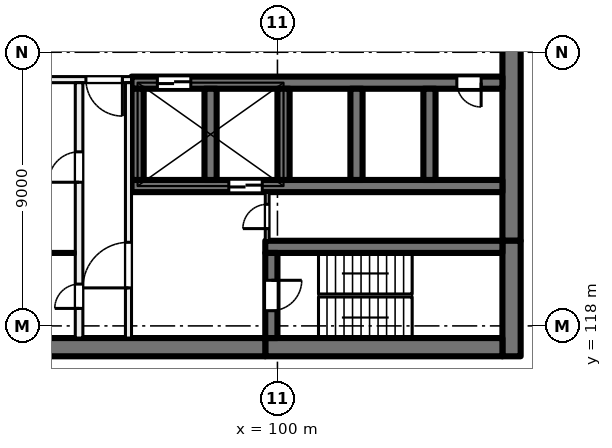
"""IFC4 building model, lengths in metres.
Left out: names, types, materials, properties, quantities, classifications, styles, units other than length and angle.
Written with IfcOpenShell. Run it as: python <this file> out.ifc"""

import sys

from ifc_helpers import new_model, si_unit, direction, frame, frame_2d, origin, place, context, subcontext, project, spatial, rectangle, extrude, element, fill, save


model = new_model("IFC4")
c1 = context("Model", 3, precision=1e-05, world=origin(), true_north=direction((0.0, 1.0)))
c2 = subcontext(c1, "Body", "Model", "MODEL_VIEW")
j1 = project(units=[si_unit("LENGTHUNIT", "METRE"), si_unit("PLANEANGLEUNIT", "RADIAN")], contexts=[c1])
p1 = place(None, origin())
s1 = spatial("IfcSite", under=j1, at=p1, CompositionType="ELEMENT")
p2 = place(p1, origin())
s2 = spatial("IfcBuilding", under=s1, at=p2, CompositionType="ELEMENT")
p3 = place(p2, frame((0.0, 0.0, 63.5)))
s3 = spatial("IfcBuildingStorey", under=s2, at=p3, CompositionType="ELEMENT", Elevation=63.5)
p4 = place(p3, frame((107.7, 135.2, 0.0), z_axis=(0.0, 0.0, 1.0), x_axis=(0.0, -1.0, 0.0)))
e1 = element("IfcWall", 1, at=p4, inside=s3, PredefinedType="SHEAR", context=c2, shape_type="SweptSolid", body=[
    extrude(rectangle(XDim=14.4, YDim=0.6, at=frame_2d((7.2, 0.0))), origin(), (0.0, 0.0, 1.0), 4.0),
])
p5 = place(p3, frame((107.7, 120.8, 0.0), z_axis=(0.0, 0.0, 1.0), x_axis=(0.0, -1.0, 0.0)))
e2 = element("IfcWall", 2, at=p5, inside=s3, PredefinedType="SHEAR", context=c2, shape_type="SweptSolid", body=[
    extrude(rectangle(XDim=3.8, YDim=0.6, at=frame_2d((1.9, 0.0))), origin(), (0.0, 0.0, 1.0), 4.0),
])
p6 = place(p3, frame((107.4, 117.3, 0.0), z_axis=(0.0, 0.0, 1.0), x_axis=(-1.0, 0.0, 0.0)))
e3 = element("IfcWall", 3, at=p6, inside=s3, PredefinedType="SHEAR", context=c2, shape_type="SweptSolid", body=[
    extrude(rectangle(XDim=7.8, YDim=0.6, at=frame_2d((3.9, 0.0))), origin(), (0.0, 0.0, 1.0), 4.0),
])
p7 = place(p3, frame((99.6, 117.3, 0.0), z_axis=(0.0, 0.0, 1.0), x_axis=(-1.0, 0.0, 0.0)))
e4 = element("IfcWall", 4, at=p7, inside=s3, PredefinedType="SHEAR", context=c2, shape_type="SweptSolid", body=[
    extrude(rectangle(XDim=8.9, YDim=0.6, at=frame_2d((4.45, 0.0))), origin(), (0.0, 0.0, 1.0), 4.0),
])
p8 = place(p3, frame((107.4, 120.6, 0.0), z_axis=(0.0, 0.0, 1.0), x_axis=(-1.0, 0.0, 0.0)))
e5 = element("IfcWall", 5, at=p8, inside=s3, PredefinedType="SHEAR", context=c2, shape_type="SweptSolid", body=[
    extrude(rectangle(XDim=7.8, YDim=0.4, at=frame_2d((3.9, 0.0))), origin(), (0.0, 0.0, 1.0), 4.0),
])
p9 = place(p3, frame((99.8, 120.4, 0.0), z_axis=(0.0, 0.0, 1.0), x_axis=(0.0, -1.0, 0.0)))
e6 = element("IfcWall", 6, at=p9, inside=s3, PredefinedType="SHEAR", context=c2, shape_type="SweptSolid", body=[
    extrude(rectangle(XDim=2.8, YDim=0.4, at=frame_2d((1.4, 0.0))), origin(), (0.0, 0.0, 1.0), 4.0),
])
p10 = place(p9, frame((0.9, 0.0, 0.0)))
e7 = element("IfcOpeningElement", 7, at=p10, cuts=e6, PredefinedType="OPENING", context=c2, shape_type="SweptSolid", body=[
    extrude(rectangle(XDim=1.0, YDim=2.1, at=frame_2d((0.5, 1.05))), frame((0.0, 0.21, 0.0), z_axis=(0.0, -1.0, 0.0), x_axis=(1.0, 0.0, 0.0)), (0.0, 0.0, 1.0), 0.42),
])
p11 = place(p3, frame((107.4, 126.0, 0.0), z_axis=(0.0, 0.0, 1.0), x_axis=(-1.0, 0.0, 0.0)))
e8 = element("IfcWall", 8, at=p11, inside=s3, PredefinedType="SHEAR", context=c2, shape_type="SweptSolid", body=[
    extrude(rectangle(XDim=12.2, YDim=0.4, at=frame_2d((6.1, 0.0))), origin(), (0.0, 0.0, 1.0), 4.0),
])
p12 = place(p11, frame((10.25, 0.0, 0.0)))
e9 = element("IfcOpeningElement", 9, at=p12, cuts=e8, PredefinedType="OPENING", context=c2, shape_type="SweptSolid", body=[
    extrude(rectangle(XDim=1.1, YDim=2.1, at=frame_2d((0.55, 1.05))), frame((0.0, 0.21, 0.0), z_axis=(0.0, -1.0, 0.0), x_axis=(1.0, 0.0, 0.0)), (0.0, 0.0, 1.0), 0.42),
])
p13 = place(p11, frame((0.7, 0.0, 0.0)))
e10 = element("IfcOpeningElement", 10, at=p13, cuts=e8, PredefinedType="OPENING", context=c2, shape_type="SweptSolid", body=[
    extrude(rectangle(XDim=0.8, YDim=2.1, at=frame_2d((0.4, 1.05))), frame((0.0, 0.21, 0.0), z_axis=(0.0, -1.0, 0.0), x_axis=(1.0, 0.0, 0.0)), (0.0, 0.0, 1.0), 0.42),
])
p14 = place(p3, frame((107.4, 122.6, 0.0), z_axis=(0.0, 0.0, 1.0), x_axis=(-1.0, 0.0, 0.0)))
e11 = element("IfcWall", 11, at=p14, inside=s3, PredefinedType="SHEAR", context=c2, shape_type="SweptSolid", body=[
    extrude(rectangle(XDim=12.2, YDim=0.4, at=frame_2d((6.1, 0.0))), origin(), (0.0, 0.0, 1.0), 4.0),
])
p15 = place(p14, frame((7.9, 0.0, 0.0)))
e12 = element("IfcOpeningElement", 12, at=p15, cuts=e11, PredefinedType="OPENING", context=c2, shape_type="SweptSolid", body=[
    extrude(rectangle(XDim=1.1, YDim=2.1, at=frame_2d((0.55, 1.05))), frame((0.0, 0.21, 0.0), z_axis=(0.0, -1.0, 0.0), x_axis=(1.0, 0.0, 0.0)), (0.0, 0.0, 1.0), 0.42),
])
for number, where, z_axis, x_axis in (
    (13, (105.0, 125.8, 0.0), (0.0, 0.0, 1.0), (0.0, -1.0, 0.0)),
    (14, (102.6, 125.8, 0.0), (0.0, 0.0, 1.0), (0.0, -1.0, 0.0)),
    (15, (100.2, 125.8, 0.0), (0.0, 0.0, 1.0), (0.0, -1.0, 0.0)),
    (16, (97.8, 125.8, 0.0), (0.0, 0.0, 1.0), (0.0, -1.0, 0.0)),
    (17, (95.4, 125.8, 0.0), (0.0, 0.0, 1.0), (0.0, -1.0, 0.0)),
):
    element("IfcWall", number, at=place(p3, frame(where, z_axis=z_axis, x_axis=x_axis)), inside=s3, PredefinedType="SHEAR", context=c2, shape_type="SweptSolid", body=[
        extrude(rectangle(XDim=3.0, YDim=0.4, at=frame_2d((1.5, 0.0))), origin(), (0.0, 0.0, 1.0), 4.0),
    ])
p16 = place(p3, frame((95.2, 126.1, 0.0), z_axis=(0.0, 0.0, 1.0), x_axis=(-1.0, 0.0, 0.0)))
e18 = element("IfcWall", 18, at=p16, inside=s3, PredefinedType="PARTITIONING", context=c2, shape_type="SweptSolid", body=[
    extrude(rectangle(XDim=3.8, YDim=0.2, at=frame_2d((1.9, 0.0))), origin(), (0.0, 0.0, 1.0), 3.625),
])
p17 = place(p16, frame((0.3, 0.0, 0.0)))
e19 = element("IfcOpeningElement", 19, at=p17, cuts=e18, PredefinedType="OPENING", context=c2, shape_type="SweptSolid", body=[
    extrude(rectangle(XDim=1.2, YDim=2.1, at=frame_2d((0.6, 1.05))), frame((0.0, 0.11, 0.0), z_axis=(0.0, -1.0, 0.0), x_axis=(1.0, 0.0, 0.0)), (0.0, 0.0, 1.0), 0.22),
])
p18 = place(p3, frame((95.1, 117.6, 0.0), z_axis=(0.0, 0.0, 1.0), x_axis=(0.0, 1.0, 0.0)))
e20 = element("IfcWall", 20, at=p18, inside=s3, PredefinedType="PARTITIONING", context=c2, shape_type="SweptSolid", body=[
    extrude(rectangle(XDim=8.4, YDim=0.2, at=frame_2d((4.2, 0.0))), origin(), (0.0, 0.0, 1.0), 3.625),
])
p19 = place(p18, frame((1.65, 0.0, 0.0)))
e21 = element("IfcOpeningElement", 21, at=p19, cuts=e20, PredefinedType="OPENING", context=c2, shape_type="SweptSolid", body=[
    extrude(rectangle(XDim=1.5, YDim=2.1, at=frame_2d((0.75, 1.05))), frame((0.0, 0.11, 0.0), z_axis=(0.0, -1.0, 0.0), x_axis=(1.0, 0.0, 0.0)), (0.0, 0.0, 1.0), 0.22),
])
p20 = place(p3, frame((93.475, 117.6, 0.0), z_axis=(0.0, 0.0, 1.0), x_axis=(0.0, 1.0, 0.0)))
e22 = element("IfcWall", 22, at=p20, inside=s3, PredefinedType="PARTITIONING", context=c2, shape_type="SweptSolid", body=[
    extrude(rectangle(XDim=8.4, YDim=0.25, at=frame_2d((4.2, 0.0))), origin(), (0.0, 0.0, 1.0), 3.625),
])
p21 = place(p20, frame((5.125, 0.0, 0.0)))
e23 = element("IfcOpeningElement", 23, at=p21, cuts=e22, PredefinedType="OPENING", context=c2, shape_type="SweptSolid", body=[
    extrude(rectangle(XDim=1.0, YDim=2.1, at=frame_2d((0.5, 1.05))), frame((0.0, 0.135, 0.0), z_axis=(0.0, -1.0, 0.0), x_axis=(1.0, 0.0, 0.0)), (0.0, 0.0, 1.0), 0.27),
])
p22 = place(p20, frame((0.975, 0.0, 0.0)))
e24 = element("IfcOpeningElement", 24, at=p22, cuts=e22, PredefinedType="OPENING", context=c2, shape_type="SweptSolid", body=[
    extrude(rectangle(XDim=0.8, YDim=2.1, at=frame_2d((0.4, 1.05))), frame((0.0, 0.135, 0.0), z_axis=(0.0, -1.0, 0.0), x_axis=(1.0, 0.0, 0.0)), (0.0, 0.0, 1.0), 0.27),
])
p23 = place(p3, frame((99.663, 120.8, 0.0), z_axis=(0.0, 0.0, 1.0), x_axis=(0.0, 1.0, 0.0)))
e25 = element("IfcWall", 25, at=p23, inside=s3, PredefinedType="PARTITIONING", context=c2, shape_type="SweptSolid", body=[
    extrude(rectangle(XDim=1.6, YDim=0.125, at=frame_2d((0.8, 0.0))), origin(), (0.0, 0.0, 1.0), 3.625),
])
p24 = place(p23, frame((0.4, 0.0, 0.0)))
e26 = element("IfcOpeningElement", 26, at=p24, cuts=e25, PredefinedType="OPENING", context=c2, shape_type="SweptSolid", body=[
    extrude(rectangle(XDim=0.8, YDim=2.1, at=frame_2d((0.4, 1.05))), frame((0.0, 0.073, 0.0), z_axis=(0.0, -1.0, 0.0), x_axis=(1.0, 0.0, 0.0)), (0.0, 0.0, 1.0), 0.145),
])
p25 = place(p3, frame((93.35, 120.4, 0.0), z_axis=(0.0, 0.0, 1.0), x_axis=(-1.0, 0.0, 0.0)))
e27 = element("IfcWall", 27, at=p25, inside=s3, PredefinedType="PARTITIONING", context=c2, shape_type="SweptSolid", body=[
    extrude(rectangle(XDim=1.95, YDim=0.1, at=frame_2d((0.975, 0.0))), origin(), (0.0, 0.0, 1.0), 3.625),
])
p26 = place(p12, origin())
e28 = element("IfcDoor", 28, at=p26, inside=s3, OperationType="DOUBLE_DOOR_SLIDING", PredefinedType="DOOR", context=c2, shape_type="SweptSolid", body=[
    extrude(rectangle(XDim=1.1, YDim=2.1, at=frame_2d((0.55, 1.05))), frame((0.0, 0.025, 0.0), z_axis=(0.0, -1.0, 0.0), x_axis=(1.0, 0.0, 0.0)), (0.0, 0.0, 1.0), 0.05),
])
fill(e9, e28)
p27 = place(p13, origin())
e29 = element("IfcDoor", 29, at=p27, inside=s3, OperationType="SINGLE_SWING_LEFT", PredefinedType="DOOR", context=c2, shape_type="SweptSolid", body=[
    extrude(rectangle(XDim=0.8, YDim=2.1, at=frame_2d((0.4, 1.05))), frame((0.0, 0.025, 0.0), z_axis=(0.0, -1.0, 0.0), x_axis=(1.0, 0.0, 0.0)), (0.0, 0.0, 1.0), 0.05),
])
fill(e10, e29)
p28 = place(p17, origin())
e30 = element("IfcDoor", 30, at=p28, inside=s3, OperationType="DOUBLE_DOOR_SINGLE_SWING", PredefinedType="DOOR", context=c2, shape_type="SweptSolid", body=[
    extrude(rectangle(XDim=1.2, YDim=2.1, at=frame_2d((0.6, 1.05))), frame((0.0, 0.025, 0.0), z_axis=(0.0, -1.0, 0.0), x_axis=(1.0, 0.0, 0.0)), (0.0, 0.0, 1.0), 0.05),
])
fill(e19, e30)
p29 = place(p19, origin())
e31 = element("IfcDoor", 31, at=p29, inside=s3, OperationType="DOUBLE_DOOR_SINGLE_SWING", PredefinedType="DOOR", context=c2, shape_type="SweptSolid", body=[
    extrude(rectangle(XDim=1.5, YDim=2.1, at=frame_2d((0.75, 1.05))), frame((0.0, 0.025, 0.0), z_axis=(0.0, -1.0, 0.0), x_axis=(1.0, 0.0, 0.0)), (0.0, 0.0, 1.0), 0.05),
])
fill(e21, e31)
p30 = place(p10, origin())
e32 = element("IfcDoor", 32, at=p30, inside=s3, OperationType="SINGLE_SWING_LEFT", PredefinedType="DOOR", context=c2, shape_type="SweptSolid", body=[
    extrude(rectangle(XDim=1.0, YDim=2.1, at=frame_2d((0.5, 1.05))), frame((0.0, 0.025, 0.0), z_axis=(0.0, -1.0, 0.0), x_axis=(1.0, 0.0, 0.0)), (0.0, 0.0, 1.0), 0.05),
])
fill(e7, e32)
p31 = place(p24, origin())
e33 = element("IfcDoor", 33, at=p31, inside=s3, OperationType="SINGLE_SWING_RIGHT", PredefinedType="DOOR", context=c2, shape_type="SweptSolid", body=[
    extrude(rectangle(XDim=0.8, YDim=2.1, at=frame_2d((0.4, 1.05))), frame((0.0, 0.025, 0.0), z_axis=(0.0, -1.0, 0.0), x_axis=(1.0, 0.0, 0.0)), (0.0, 0.0, 1.0), 0.05),
])
fill(e26, e33)
p32 = place(p21, origin())
e34 = element("IfcDoor", 34, at=p32, inside=s3, OperationType="SINGLE_SWING_LEFT", PredefinedType="DOOR", context=c2, shape_type="SweptSolid", body=[
    extrude(rectangle(XDim=1.0, YDim=2.1, at=frame_2d((0.5, 1.05))), frame((0.0, 0.025, 0.0), z_axis=(0.0, -1.0, 0.0), x_axis=(1.0, 0.0, 0.0)), (0.0, 0.0, 1.0), 0.05),
])
fill(e23, e34)
p33 = place(p22, origin())
e35 = element("IfcDoor", 35, at=p33, inside=s3, OperationType="SINGLE_SWING_RIGHT", PredefinedType="DOOR", context=c2, shape_type="SweptSolid", body=[
    extrude(rectangle(XDim=0.8, YDim=2.1, at=frame_2d((0.4, 1.05))), frame((0.0, 0.025, 0.0), z_axis=(0.0, -1.0, 0.0), x_axis=(1.0, 0.0, 0.0)), (0.0, 0.0, 1.0), 0.05),
])
fill(e24, e35)
p34 = place(p15, origin())
e36 = element("IfcDoor", 36, at=p34, inside=s3, OperationType="DOUBLE_DOOR_SLIDING", PredefinedType="DOOR", context=c2, shape_type="SweptSolid", body=[
    extrude(rectangle(XDim=1.1, YDim=2.1, at=frame_2d((0.55, 1.05))), frame((0.0, 0.025, 0.0), z_axis=(0.0, -1.0, 0.0), x_axis=(1.0, 0.0, 0.0)), (0.0, 0.0, 1.0), 0.05),
])
fill(e12, e36)
save(model, sys.argv[1])
